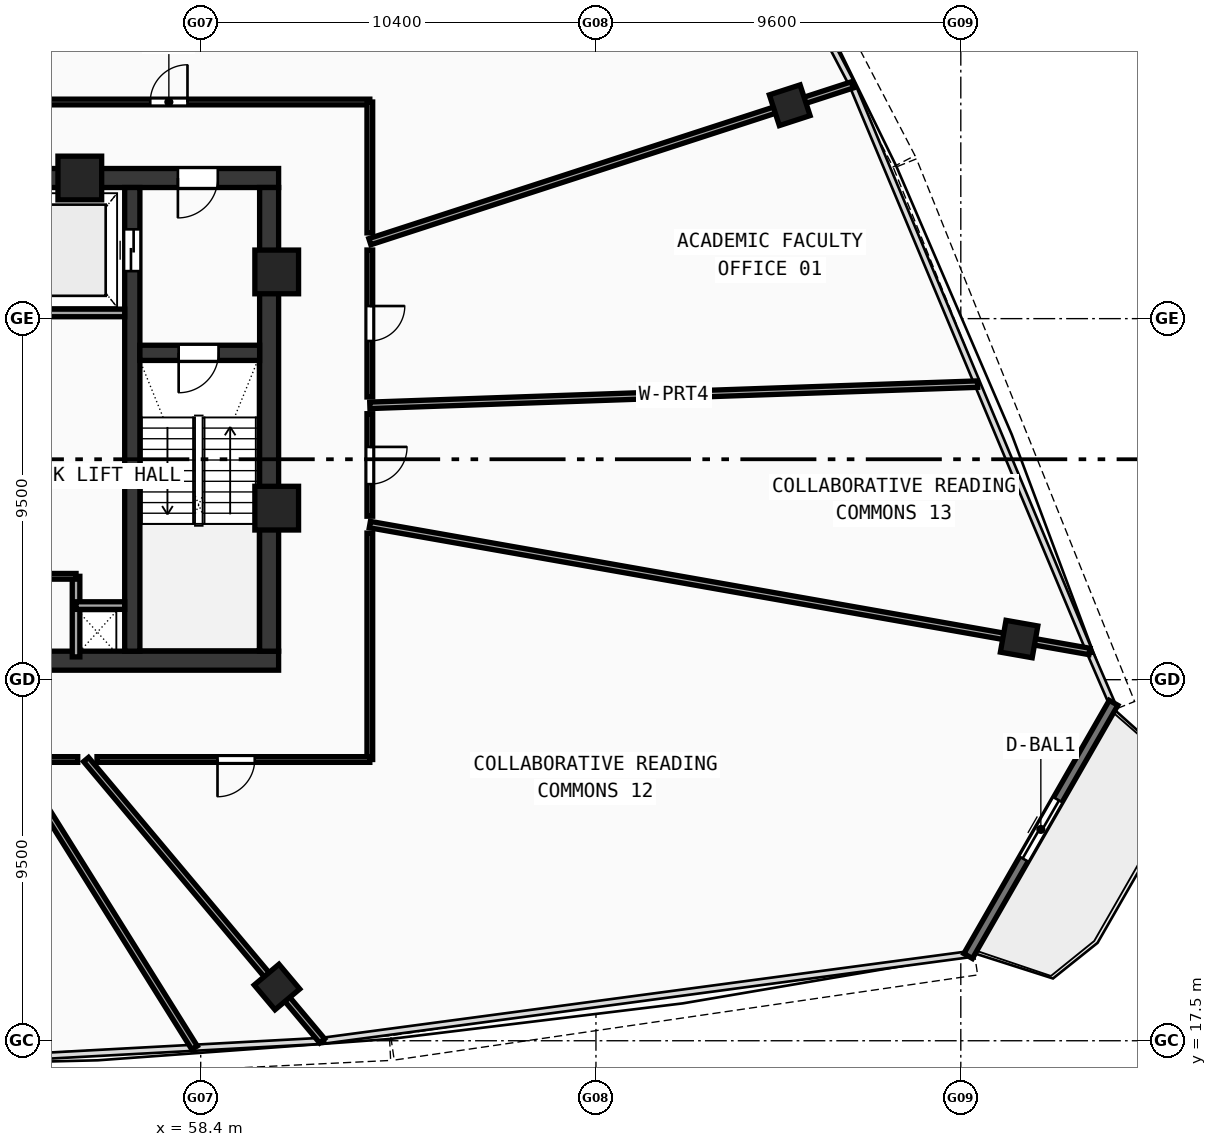
"""IFC4 building model, lengths in metres.
Left out: names, types, materials, properties, quantities, classifications, styles, units other than length and angle.
Written with IfcOpenShell. Run it as: python <this file> out.ifc"""

import sys

from ifc_helpers import new_model, si_unit, direction, frame, frame_2d, origin, origin_with_axes, origin_2d, place, context, subcontext, project, spatial, rectangle, hollow_rectangle, extrude, source, transform, mapped, element, fill, save


model = new_model("IFC4")
c1 = context("Model", 3, precision=1e-05, world=origin(), true_north=direction((0.0, 1.0)))
c2 = subcontext(c1, "Body", "Model", "MODEL_VIEW")
j1 = project(units=[si_unit("LENGTHUNIT", "METRE"), si_unit("PLANEANGLEUNIT", "RADIAN")], contexts=[c1])
p1 = place(None, origin())
s1 = spatial("IfcSite", under=j1, at=p1, CompositionType="ELEMENT")
p2 = place(p1, origin())
s2 = spatial("IfcBuilding", under=s1, at=p2, CompositionType="ELEMENT")
p3 = place(p2, frame((0.0, 0.0, 251.99)))
s3 = spatial("IfcBuildingStorey", under=s2, at=p3, CompositionType="ELEMENT", Elevation=251.99)
p4 = place(p3, frame((35.55, 27.5, 0.0), z_axis=(0.0, 0.0, 1.0), x_axis=(1.0, 0.0, 0.0)))
e1 = element("IfcWall", 1, at=p4, inside=s3, PredefinedType="SHEAR", context=c2, shape_type="SweptSolid", body=[
    extrude(rectangle(XDim=24.9, YDim=0.5, at=frame_2d((12.45, 0.0))), origin(), (0.0, 0.0, 1.0), 3.47),
])
p5 = place(p3, frame((49.2, 40.2, 0.0), z_axis=(0.0, 0.0, 1.0), x_axis=(1.0, 0.0, 0.0)))
e2 = element("IfcWall", 2, at=p5, inside=s3, PredefinedType="SHEAR", context=c2, shape_type="SweptSolid", body=[
    extrude(rectangle(XDim=11.25, YDim=0.5, at=frame_2d((5.625, 0.0))), origin(), (0.0, 0.0, 1.0), 3.47),
])
p6 = place(p5, frame((8.6, 0.0, 0.0)))
e3 = element("IfcOpeningElement", 3, at=p6, cuts=e2, PredefinedType="OPENING", context=c2, shape_type="SweptSolid", body=[
    extrude(rectangle(XDim=1.05, YDim=2.1, at=frame_2d((0.525, 1.05))), frame((0.0, 0.26, 0.0), z_axis=(0.0, -1.0, 0.0), x_axis=(1.0, 0.0, 0.0)), (0.0, 0.0, 1.0), 0.52),
])
p7 = place(p3, frame((60.2, 27.75, 0.0), z_axis=(0.0, 0.0, 1.0), x_axis=(0.0, 1.0, 0.0)))
e4 = element("IfcWall", 4, at=p7, inside=s3, PredefinedType="SHEAR", context=c2, shape_type="SweptSolid", body=[
    extrude(rectangle(XDim=12.2, YDim=0.5, at=frame_2d((6.1, 0.0))), origin(), (0.0, 0.0, 1.0), 3.47),
])
p8 = place(p3, frame((56.6, 27.75, 0.0), z_axis=(0.0, 0.0, 1.0), x_axis=(0.0, 1.0, 0.0)))
e5 = element("IfcWall", 5, at=p8, inside=s3, PredefinedType="SHEAR", context=c2, shape_type="SweptSolid", body=[
    extrude(rectangle(XDim=12.2, YDim=0.4, at=frame_2d((6.1, 0.0))), origin(), (0.0, 0.0, 1.0), 3.47),
])
p9 = place(p8, frame((10.0, 0.0, 0.0)))
e6 = element("IfcOpeningElement", 6, at=p9, cuts=e5, PredefinedType="OPENING", context=c2, shape_type="SweptSolid", body=[
    extrude(rectangle(XDim=1.1, YDim=2.1, at=frame_2d((0.55, 1.05))), frame((0.0, 0.21, 0.0), z_axis=(0.0, -1.0, 0.0), x_axis=(1.0, 0.0, 0.0)), (0.0, 0.0, 1.0), 0.42),
])
p10 = place(p3, frame((56.8, 35.6, 0.0), z_axis=(0.0, 0.0, 1.0), x_axis=(1.0, 0.0, 0.0)))
e7 = element("IfcWall", 7, at=p10, inside=s3, PredefinedType="SHEAR", context=c2, shape_type="SweptSolid", body=[
    extrude(rectangle(XDim=3.15, YDim=0.4, at=frame_2d((1.575, 0.0))), origin(), (0.0, 0.0, 1.0), 3.47),
])
p11 = place(p10, frame((1.02, 0.0, 0.0)))
e8 = element("IfcOpeningElement", 8, at=p11, cuts=e7, PredefinedType="OPENING", context=c2, shape_type="SweptSolid", body=[
    extrude(rectangle(XDim=1.05, YDim=2.1, at=frame_2d((0.525, 1.05))), frame((0.0, 0.21, 0.0), z_axis=(0.0, -1.0, 0.0), x_axis=(1.0, 0.0, 0.0)), (0.0, 0.0, 1.0), 0.42),
])
m1 = source(origin(), c2, "Body", "SweptSolid", [
    extrude(hollow_rectangle(XDim=1.15, YDim=1.15, WallThickness=0.048, at=origin_2d()), origin(), (0.0, 0.0, 1.0), 3.73),
])
for number, where, z_axis, x_axis in (
    (9, (60.4, 31.513, -0.26), (0.0, 0.0, 1.0), (1.0, 0.0, 0.0)),
    (10, (60.4, 37.729, -0.26), (0.0, 0.0, 1.0), (1.0, 0.0, 0.0)),
    (11, (55.219, 40.2, -0.26), (0.0, 0.0, 1.0), (1.0, 0.0, 0.0)),
):
    element("IfcColumn", number, at=place(p3, frame(where, z_axis=z_axis, x_axis=x_axis)), inside=s3, PredefinedType="COLUMN", context=c2, shape_type="MappedRepresentation", body=[
        mapped(m1, transform((0.0, 0.0, 0.0), scale=1.0)),
    ])
m2 = source(origin(), c2, "Body", "SweptSolid", [
    extrude(hollow_rectangle(XDim=0.85, YDim=0.85, WallThickness=0.034, at=origin_2d()), origin(), (0.0, 0.0, 1.0), 3.73),
])
for number, where, z_axis, x_axis in (
    (12, (60.407, 18.914, -0.26), (0.0, 0.0, 1.0), (0.766, 0.643, 0.0)),
    (13, (79.934, 28.069, -0.26), (0.0, 0.0, 1.0), (0.174, 0.985, 0.0)),
    (14, (73.899, 42.115, -0.26), (0.0, 0.0, 1.0), (-0.309, 0.951, 0.0)),
):
    element("IfcColumn", number, at=place(p3, frame(where, z_axis=z_axis, x_axis=x_axis)), inside=s3, PredefinedType="COLUMN", context=c2, shape_type="MappedRepresentation", body=[
        mapped(m2, transform((0.0, 0.0, 0.0), scale=1.0)),
    ])
p12 = place(p3, frame((78.593, 19.729, 0.0), z_axis=(0.0, 0.0, 1.0), x_axis=(0.497934343816, 0.867214730761, 0.0)))
e15 = element("IfcWall", 15, at=p12, inside=s3, PredefinedType="STANDARD", context=c2, shape_type="SweptSolid", body=[
    extrude(rectangle(XDim=7.684, YDim=0.26, at=frame_2d((3.842, 0.0))), origin(), (0.0, 0.0, 1.0), 3.47),
])
p13 = place(p12, frame((2.942, 0.0, 0.0)))
e16 = element("IfcOpeningElement", 16, at=p13, cuts=e15, PredefinedType="OPENING", context=c2, shape_type="SweptSolid", body=[
    extrude(rectangle(XDim=1.8, YDim=2.15, at=frame_2d((0.9, 1.075))), frame((0.0, 0.14, 0.0), z_axis=(0.0, -1.0, 0.0), x_axis=(1.0, 0.0, 0.0)), (0.0, 0.0, 1.0), 0.28),
])
p14 = place(p3, frame((53.68, 36.65, 0.0), z_axis=(0.0, 0.0, 1.0), x_axis=(1.0, 0.0, 0.0)))
e17 = element("IfcWall", 17, at=p14, inside=s3, PredefinedType="SOLIDWALL", context=c2, shape_type="SweptSolid", body=[
    extrude(rectangle(XDim=2.72, YDim=0.2, at=frame_2d((1.36, 0.0))), origin(), (0.0, 0.0, 1.0), 3.47),
])
p15 = place(p3, frame((55.12, 27.6, 0.0), z_axis=(0.0, 0.0, 1.0), x_axis=(0.0, 1.0, 0.0)))
e18 = element("IfcWall", 18, at=p15, inside=s3, PredefinedType="SOLIDWALL", context=c2, shape_type="SweptSolid", body=[
    extrude(rectangle(XDim=2.12, YDim=0.2, at=frame_2d((1.06, 0.0))), origin(), (0.0, 0.0, 1.0), 3.47),
])
p16 = place(p3, frame((55.12, 28.95, 0.0), z_axis=(0.0, 0.0, 1.0), x_axis=(1.0, 0.0, 0.0)))
e19 = element("IfcWall", 19, at=p16, inside=s3, PredefinedType="SOLIDWALL", context=c2, shape_type="SweptSolid", body=[
    extrude(rectangle(XDim=1.28, YDim=0.2, at=frame_2d((0.64, 0.0))), origin(), (0.0, 0.0, 1.0), 3.47),
])
p17 = place(p3, frame((51.05, 29.72, 0.0), z_axis=(0.0, 0.0, 1.0), x_axis=(1.0, 0.0, 0.0)))
e20 = element("IfcWall", 20, at=p17, inside=s3, PredefinedType="PARTITIONING", context=c2, shape_type="SweptSolid", body=[
    extrude(rectangle(XDim=4.07, YDim=0.15, at=frame_2d((2.035, 0.0))), origin(), (0.0, 0.0, 1.0), 3.47),
])
p18 = place(p17, frame((0.5, 0.0, 0.0)))
e21 = element("IfcOpeningElement", 21, at=p18, cuts=e20, PredefinedType="OPENING", context=c2, shape_type="SweptSolid", body=[
    extrude(rectangle(XDim=0.9, YDim=2.1, at=frame_2d((0.45, 1.05))), frame((0.0, 0.085, 0.0), z_axis=(0.0, -1.0, 0.0), x_axis=(1.0, 0.0, 0.0)), (0.0, 0.0, 1.0), 0.17),
])
p19 = place(p3, frame((62.85, 34.219, 0.0), z_axis=(0.0, 0.0, 1.0), x_axis=(0.99939049717, 0.034908941063, 0.0)))
e22 = element("IfcWall", 22, at=p19, inside=s3, PredefinedType="PARTITIONING", context=c2, shape_type="SweptSolid", body=[
    extrude(rectangle(XDim=16.001, YDim=0.17, at=frame_2d((8.001, 0.0))), origin(), (0.0, 0.0, 1.0), 2.82),
])
p20 = place(p3, frame((62.85, 38.525, 0.0), z_axis=(0.0, 0.0, 1.0), x_axis=(0.951055435747, 0.30902031994, 0.0)))
e23 = element("IfcWall", 23, at=p20, inside=s3, PredefinedType="PARTITIONING", context=c2, shape_type="SweptSolid", body=[
    extrude(rectangle(XDim=13.349, YDim=0.17, at=frame_2d((6.675, 0.0))), origin(), (0.0, 0.0, 1.0), 2.82),
])
p21 = place(p3, frame((51.784, 42.2, 0.0), z_axis=(0.0, 0.0, 1.0), x_axis=(0.406736188948, 0.913545659833, 0.0)))
e24 = element("IfcWall", 24, at=p21, inside=s3, PredefinedType="PARTITIONING", context=c2, shape_type="SweptSolid", body=[
    extrude(rectangle(XDim=25.501, YDim=0.17, at=frame_2d((12.75, 0.0))), origin(), (0.0, 0.0, 1.0), 2.82),
])
p22 = place(p3, frame((53.499, 24.9, 0.0), z_axis=(0.0, 0.0, 1.0), x_axis=(0.529920411872, -0.848047379031, 0.0)))
e25 = element("IfcWall", 25, at=p22, inside=s3, PredefinedType="PARTITIONING", context=c2, shape_type="SweptSolid", body=[
    extrude(rectangle(XDim=8.943, YDim=0.17, at=frame_2d((4.471, 0.0))), origin(), (0.0, 0.0, 1.0), 2.82),
])
p23 = place(p3, frame((55.384, 24.9, 0.0), z_axis=(0.0, 0.0, 1.0), x_axis=(0.642795010628, -0.766038232931, 0.0)))
e26 = element("IfcWall", 26, at=p23, inside=s3, PredefinedType="PARTITIONING", context=c2, shape_type="SweptSolid", body=[
    extrude(rectangle(XDim=9.663, YDim=0.17, at=frame_2d((4.832, 0.0))), origin(), (0.0, 0.0, 1.0), 2.82),
])
p24 = place(p3, frame((62.85, 31.082, 0.0), z_axis=(0.0, 0.0, 1.0), x_axis=(0.984808346381, -0.173644812474, 0.0)))
e27 = element("IfcWall", 27, at=p24, inside=s3, PredefinedType="PARTITIONING", context=c2, shape_type="SweptSolid", body=[
    extrude(rectangle(XDim=19.228, YDim=0.17, at=frame_2d((9.614, 0.0))), origin(), (0.0, 0.0, 1.0), 2.82),
])
p25 = place(p3, frame((52.025, 42.2, 0.0), z_axis=(0.0, 0.0, 1.0), x_axis=(1.0, 0.0, 0.0)))
e28 = element("IfcWall", 28, at=p25, inside=s3, PredefinedType="PARTITIONING", context=c2, shape_type="SweptSolid", body=[
    extrude(rectangle(XDim=10.825, YDim=0.15, at=frame_2d((5.413, 0.0))), origin(), (0.0, 0.0, 1.0), 2.82),
])
p26 = place(p25, frame((5.047, 0.0, 0.0)))
e29 = element("IfcOpeningElement", 29, at=p26, cuts=e28, PredefinedType="OPENING", context=c2, shape_type="SweptSolid", body=[
    extrude(rectangle(XDim=0.98, YDim=2.12, at=frame_2d((0.49, 1.06))), frame((0.0, 0.085, 0.0), z_axis=(0.0, -1.0, 0.0), x_axis=(1.0, 0.0, 0.0)), (0.0, 0.0, 1.0), 0.17),
])
p27 = place(p3, frame((62.85, 42.2, 0.0), z_axis=(0.0, 0.0, 1.0), x_axis=(0.0, -1.0, 0.0)))
e30 = element("IfcWall", 30, at=p27, inside=s3, PredefinedType="PARTITIONING", context=c2, shape_type="SweptSolid", body=[
    extrude(rectangle(XDim=3.444, YDim=0.15, at=frame_2d((1.722, 0.0))), origin(), (0.0, 0.0, 1.0), 3.12),
])
p28 = place(p3, frame((62.85, 38.305, 0.0), z_axis=(0.0, 0.0, 1.0), x_axis=(0.0, -1.0, 0.0)))
e31 = element("IfcWall", 31, at=p28, inside=s3, PredefinedType="PARTITIONING", context=c2, shape_type="SweptSolid", body=[
    extrude(rectangle(XDim=3.867, YDim=0.15, at=frame_2d((1.933, 0.0))), origin(), (0.0, 0.0, 1.0), 3.47),
])
p29 = place(p28, frame((1.473, 0.0, 0.0)))
e32 = element("IfcOpeningElement", 32, at=p29, cuts=e31, PredefinedType="OPENING", context=c2, shape_type="SweptSolid", body=[
    extrude(rectangle(XDim=0.92, YDim=2.1, at=frame_2d((0.46, 1.05))), frame((0.0, 0.085, 0.0), z_axis=(0.0, -1.0, 0.0), x_axis=(1.0, 0.0, 0.0)), (0.0, 0.0, 1.0), 0.17),
])
p30 = place(p3, frame((62.85, 33.999, 0.0), z_axis=(0.0, 0.0, 1.0), x_axis=(0.0, -1.0, 0.0)))
e33 = element("IfcWall", 33, at=p30, inside=s3, PredefinedType="PARTITIONING", context=c2, shape_type="SweptSolid", body=[
    extrude(rectangle(XDim=2.698, YDim=0.15, at=frame_2d((1.349, 0.0))), origin(), (0.0, 0.0, 1.0), 3.47),
])
p31 = place(p30, frame((0.874, 0.0, 0.0)))
e34 = element("IfcOpeningElement", 34, at=p31, cuts=e33, PredefinedType="OPENING", context=c2, shape_type="SweptSolid", body=[
    extrude(rectangle(XDim=0.98, YDim=2.12, at=frame_2d((0.49, 1.06))), frame((0.0, 0.085, 0.0), z_axis=(0.0, -1.0, 0.0), x_axis=(1.0, 0.0, 0.0)), (0.0, 0.0, 1.0), 0.17),
])
p32 = place(p3, frame((62.85, 30.858, 0.0), z_axis=(0.0, 0.0, 1.0), x_axis=(0.0, -1.0, 0.0)))
e35 = element("IfcWall", 35, at=p32, inside=s3, PredefinedType="PARTITIONING", context=c2, shape_type="SweptSolid", body=[
    extrude(rectangle(XDim=5.958, YDim=0.15, at=frame_2d((2.979, 0.0))), origin(), (0.0, 0.0, 1.0), 3.12),
])
p33 = place(p3, frame((62.85, 24.9, 0.0), z_axis=(0.0, 0.0, 1.0), x_axis=(-1.0, 0.0, 0.0)))
e36 = element("IfcWall", 36, at=p33, inside=s3, PredefinedType="PARTITIONING", context=c2, shape_type="SweptSolid", body=[
    extrude(rectangle(XDim=7.179, YDim=0.15, at=frame_2d((3.589, 0.0))), origin(), (0.0, 0.0, 1.0), 3.12),
])
p34 = place(p33, frame((3.028, 0.0, 0.0)))
e37 = element("IfcOpeningElement", 37, at=p34, cuts=e36, PredefinedType="OPENING", context=c2, shape_type="SweptSolid", body=[
    extrude(rectangle(XDim=0.98, YDim=2.12, at=frame_2d((0.49, 1.06))), frame((0.0, 0.085, 0.0), z_axis=(0.0, -1.0, 0.0), x_axis=(1.0, 0.0, 0.0)), (0.0, 0.0, 1.0), 0.17),
])
p35 = place(p3, frame((55.164, 24.9, 0.0), z_axis=(0.0, 0.0, 1.0), x_axis=(-1.0, 0.0, 0.0)))
e38 = element("IfcWall", 38, at=p35, inside=s3, PredefinedType="PARTITIONING", context=c2, shape_type="SweptSolid", body=[
    extrude(rectangle(XDim=1.406, YDim=0.15, at=frame_2d((0.703, 0.0))), origin(), (0.0, 0.0, 1.0), 2.82),
])
m3 = source(origin(), c2, "Body", "SweptSolid", [
    extrude(rectangle(XDim=1.8, YDim=2.15, at=frame_2d((0.9, 1.075))), frame((0.0, 0.025, 0.0), z_axis=(0.0, -1.0, 0.0), x_axis=(1.0, 0.0, 0.0)), (0.0, 0.0, 1.0), 0.05),
])
p36 = place(p13, origin_with_axes())
e39 = element("IfcDoor", 39, at=p36, inside=s3, OperationType="DOUBLE_DOOR_SLIDING", PredefinedType="DOOR", context=c2, shape_type="MappedRepresentation", body=[
    mapped(m3, transform((0.0, 0.0, 0.0), scale=1.0)),
])
fill(e16, e39)
m4 = source(origin(), c2, "Body", "SweptSolid", [
    extrude(rectangle(XDim=1.05, YDim=2.1, at=frame_2d((0.525, 1.05))), frame((0.0, 0.025, 0.0), z_axis=(0.0, -1.0, 0.0), x_axis=(1.0, 0.0, 0.0)), (0.0, 0.0, 1.0), 0.05),
])
p37 = place(p11, frame((1.05, 0.0, 0.0), z_axis=(0.0, 0.0, 1.0), x_axis=(-1.0, 0.0, 0.0)))
e40 = element("IfcDoor", 40, at=p37, inside=s3, OperationType="SINGLE_SWING_RIGHT", PredefinedType="DOOR", context=c2, shape_type="MappedRepresentation", body=[
    mapped(m4, transform((0.0, 0.0, 0.0), scale=1.0)),
])
fill(e8, e40)
p38 = place(p6, frame((1.05, 0.0, 0.0), z_axis=(0.0, 0.0, 1.0), x_axis=(-1.0, 0.0, 0.0)))
e41 = element("IfcDoor", 41, at=p38, inside=s3, OperationType="SINGLE_SWING_RIGHT", PredefinedType="DOOR", context=c2, shape_type="MappedRepresentation", body=[
    mapped(m4, transform((0.0, 0.0, 0.0), scale=1.0)),
])
fill(e3, e41)
m5 = source(origin(), c2, "Body", "SweptSolid", [
    extrude(rectangle(XDim=1.1, YDim=2.1, at=frame_2d((0.55, 1.05))), frame((0.0, 0.025, 0.0), z_axis=(0.0, -1.0, 0.0), x_axis=(1.0, 0.0, 0.0)), (0.0, 0.0, 1.0), 0.05),
])
p39 = place(p9, origin_with_axes())
e42 = element("IfcDoor", 42, at=p39, inside=s3, OperationType="DOUBLE_DOOR_SLIDING", PredefinedType="DOOR", context=c2, shape_type="MappedRepresentation", body=[
    mapped(m5, transform((0.0, 0.0, 0.0), scale=1.0)),
])
fill(e6, e42)
m6 = source(origin(), c2, "Body", "SweptSolid", [
    extrude(rectangle(XDim=0.92, YDim=2.1, at=frame_2d((0.46, 1.05))), frame((0.0, 0.025, 0.0), z_axis=(0.0, -1.0, 0.0), x_axis=(1.0, 0.0, 0.0)), (0.0, 0.0, 1.0), 0.05),
])
p40 = place(p29, origin_with_axes())
e43 = element("IfcDoor", 43, at=p40, inside=s3, OperationType="SINGLE_SWING_LEFT", PredefinedType="DOOR", context=c2, shape_type="MappedRepresentation", body=[
    mapped(m6, transform((0.0, 0.0, 0.0), scale=1.0)),
])
fill(e32, e43)
m7 = source(origin(), c2, "Body", "SweptSolid", [
    extrude(rectangle(XDim=0.98, YDim=2.12, at=frame_2d((0.49, 1.06))), frame((0.0, 0.025, 0.0), z_axis=(0.0, -1.0, 0.0), x_axis=(1.0, 0.0, 0.0)), (0.0, 0.0, 1.0), 0.05),
])
p41 = place(p26, origin_with_axes())
e44 = element("IfcDoor", 44, at=p41, inside=s3, OperationType="SINGLE_SWING_RIGHT", PredefinedType="DOOR", context=c2, shape_type="MappedRepresentation", body=[
    mapped(m7, transform((0.0, 0.0, 0.0), scale=1.0)),
])
fill(e29, e44)
p42 = place(p34, origin_with_axes())
e45 = element("IfcDoor", 45, at=p42, inside=s3, OperationType="SINGLE_SWING_RIGHT", PredefinedType="DOOR", context=c2, shape_type="MappedRepresentation", body=[
    mapped(m7, transform((0.0, 0.0, 0.0), scale=1.0)),
])
fill(e37, e45)
p43 = place(p31, origin_with_axes())
e46 = element("IfcDoor", 46, at=p43, inside=s3, OperationType="SINGLE_SWING_LEFT", PredefinedType="DOOR", context=c2, shape_type="MappedRepresentation", body=[
    mapped(m7, transform((0.0, 0.0, 0.0), scale=1.0)),
])
fill(e34, e46)
save(model, sys.argv[1])
